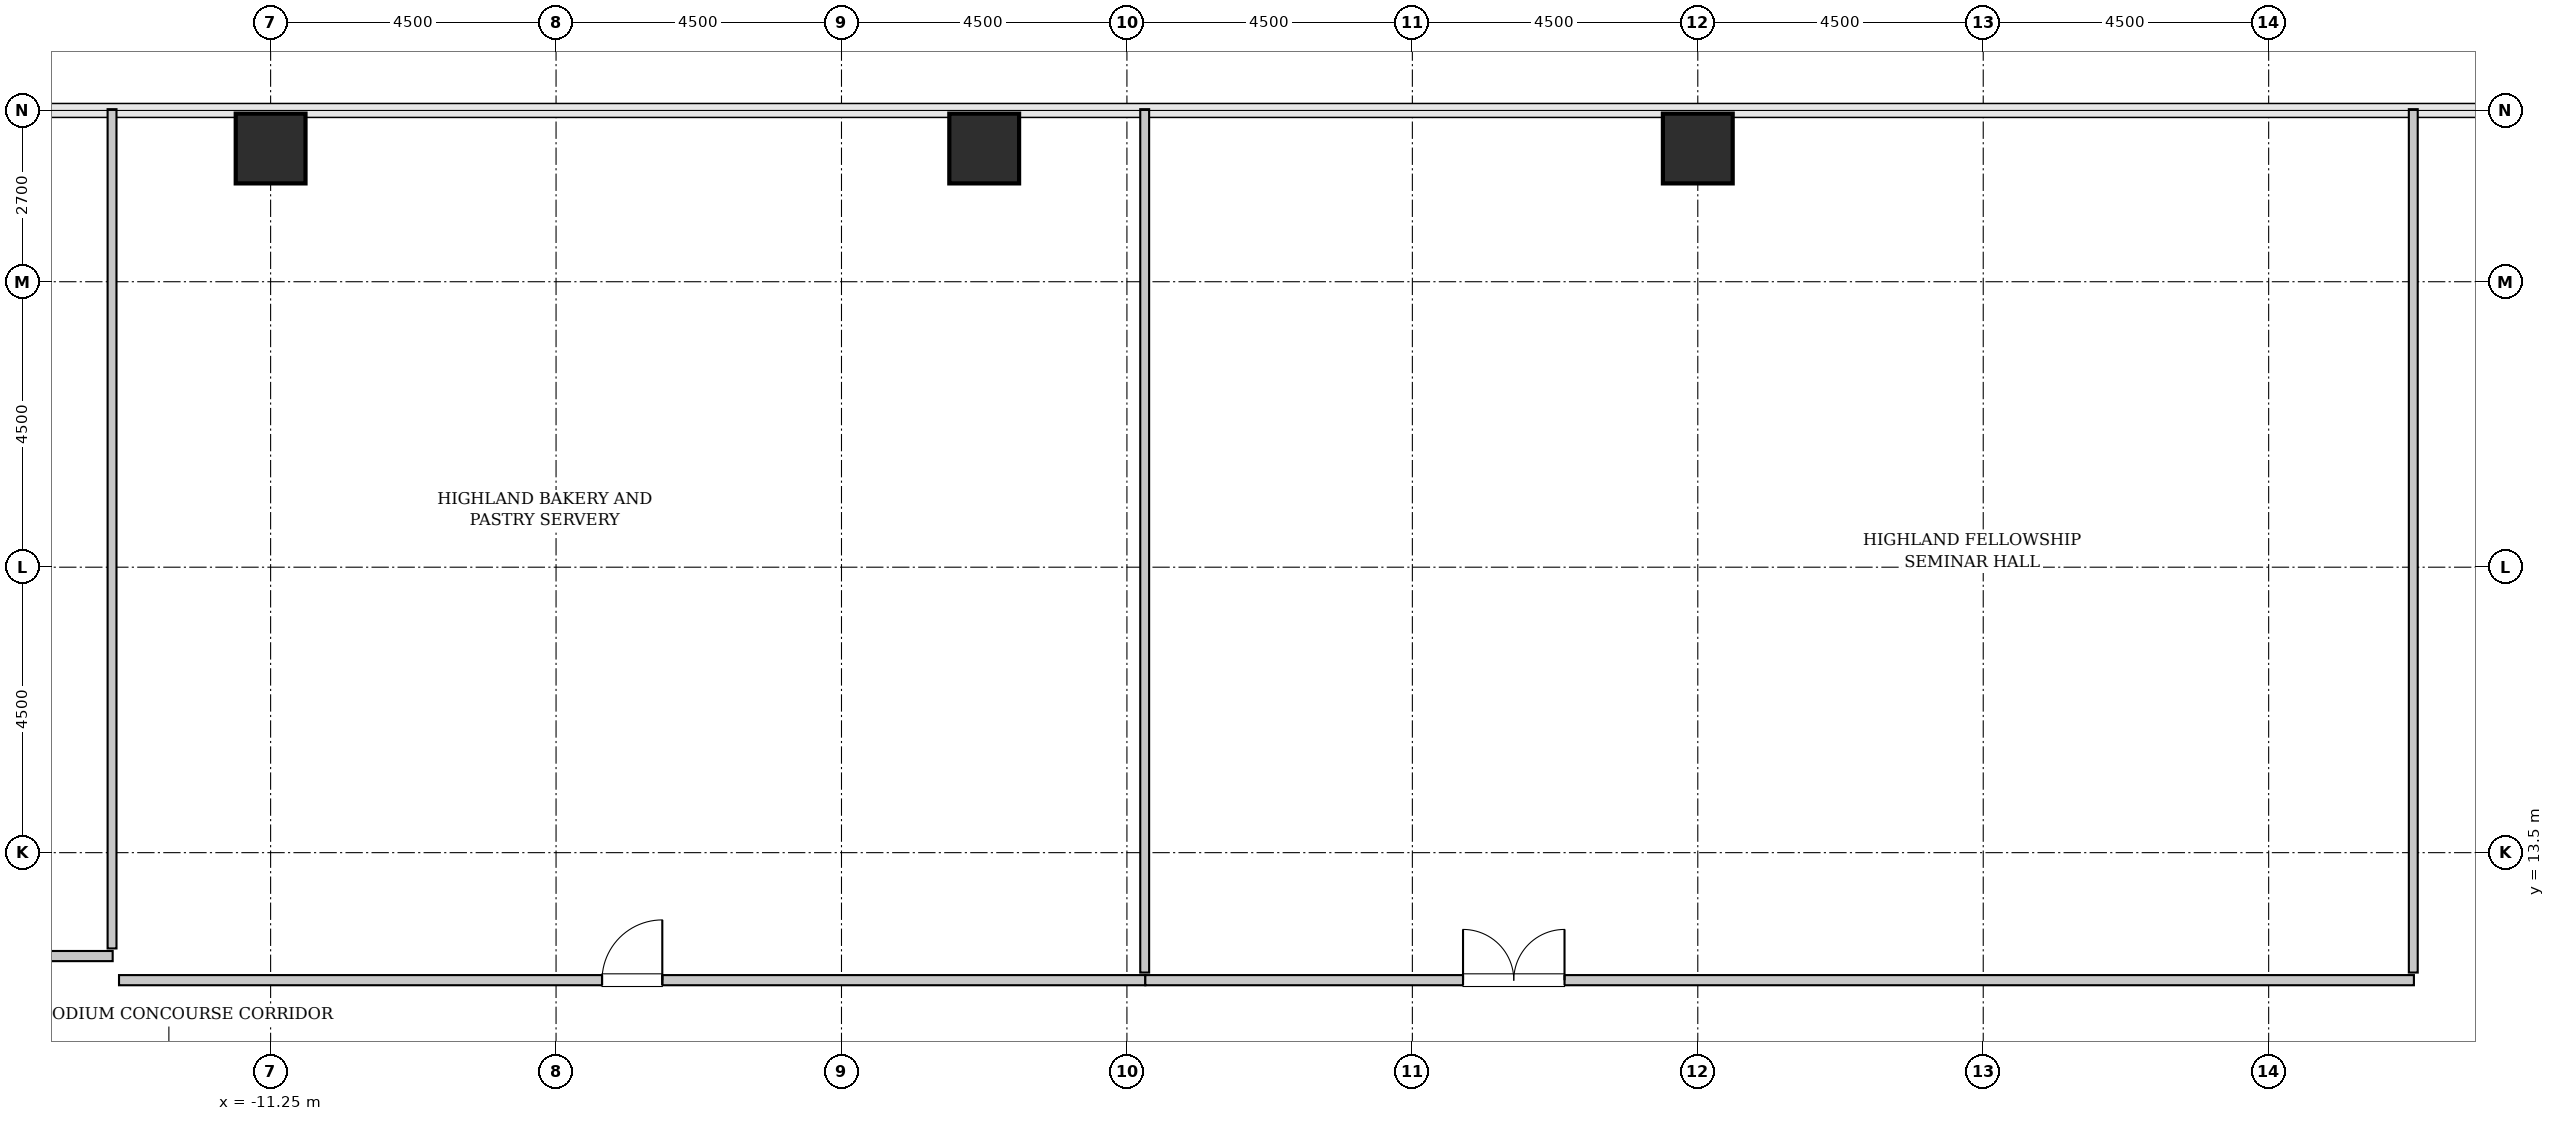
"""IFC4 building model, lengths in metres.
Left out: names, types, materials, properties, quantities, classifications, styles, units other than length and angle.
Written with IfcOpenShell. Run it as: python <this file> out.ifc"""

import sys

from ifc_helpers import new_model, si_unit, direction, frame, frame_2d, origin, origin_2d, place, context, subcontext, project, spatial, rectangle, hollow_rectangle, extrude, source, transform, mapped, element, fill, save


model = new_model("IFC4")
c1 = context("Model", 3, precision=1e-05, world=origin(), true_north=direction((0.0, 1.0)))
c2 = subcontext(c1, "Body", "Model", "MODEL_VIEW")
j1 = project(units=[si_unit("LENGTHUNIT", "METRE"), si_unit("PLANEANGLEUNIT", "RADIAN")], contexts=[c1])
p1 = place(None, origin())
s1 = spatial("IfcSite", under=j1, at=p1, CompositionType="ELEMENT")
p2 = place(p1, origin())
s2 = spatial("IfcBuilding", under=s1, at=p2, CompositionType="ELEMENT")
p3 = place(p2, frame((0.0, 0.0, 22.2)))
s3 = spatial("IfcBuildingStorey", under=s2, at=p3, CompositionType="ELEMENT", Elevation=22.2)
m1 = source(origin(), c2, "Body", "SweptSolid", [
    extrude(hollow_rectangle(XDim=1.1, YDim=1.1, WallThickness=0.055, InnerFilletRadius=0.055, OuterFilletRadius=0.11, at=origin_2d()), origin(), (0.0, 0.0, 1.0), 5.4),
])
for number, where, z_axis, x_axis in (
    (1, (-11.25, 24.6, 0.0), (0.0, 0.0, 1.0), (1.0, 0.0, 0.0)),
    (2, (0.0, 24.6, 0.0), (0.0, 0.0, 1.0), (1.0, 0.0, 0.0)),
    (3, (11.25, 24.6, 0.0), (0.0, 0.0, 1.0), (1.0, 0.0, 0.0)),
):
    element("IfcColumn", number, at=place(p3, frame(where, z_axis=z_axis, x_axis=x_axis)), inside=s3, PredefinedType="COLUMN", context=c2, shape_type="MappedRepresentation", body=[
        mapped(m1, transform((0.0, 0.0, 0.0), x_axis=(1.0, 0.0, 0.0), y_axis=(0.0, 1.0, 0.0), z_axis=(0.0, 0.0, 1.0), scale=1.0)),
    ])
m2 = source(origin(), c2, "Body", "SweptSolid", [
    extrude(rectangle(XDim=13.72, YDim=0.16, at=frame_2d((6.86, 0.0))), origin(), (0.0, 0.0, 1.0), 4.905),
])
p4 = place(p3, frame((-27.46, 11.87, 0.0), z_axis=(0.0, 0.0, 1.0), x_axis=(1.0, 0.0, 0.0)))
e4 = element("IfcWall", 4, at=p4, inside=s3, PredefinedType="PARTITIONING", context=c2, shape_type="MappedRepresentation", body=[
    mapped(m2, transform((0.0, 0.0, 0.0), x_axis=(1.0, 0.0, 0.0), y_axis=(0.0, 1.0, 0.0), z_axis=(0.0, 0.0, 1.0), scale=1.0)),
])
p5 = place(p4, frame((6.385, 0.0, 0.0)))
e5 = element("IfcOpeningElement", 5, at=p5, cuts=e4, PredefinedType="OPENING", context=c2, shape_type="SweptSolid", body=[
    extrude(rectangle(XDim=0.95, YDim=2.1, at=frame_2d((0.475, 1.05))), frame((0.0, 0.09, 0.0), z_axis=(0.0, -1.0, 0.0), x_axis=(1.0, 0.0, 0.0)), (0.0, 0.0, 1.0), 0.18),
])
m3 = source(origin(), c2, "Body", "SweptSolid", [
    extrude(rectangle(XDim=13.23, YDim=0.14, at=frame_2d((6.615, 0.0))), origin(), (0.0, 0.0, 1.0), 4.905),
])
p6 = place(p3, frame((-13.75, 11.99, 0.0), z_axis=(0.0, 0.0, 1.0), x_axis=(0.0, 1.0, 0.0)))
e6 = element("IfcWall", 6, at=p6, inside=s3, PredefinedType="PARTITIONING", context=c2, shape_type="MappedRepresentation", body=[
    mapped(m3, transform((0.0, 0.0, 0.0), x_axis=(1.0, 0.0, 0.0), y_axis=(0.0, 1.0, 0.0), z_axis=(0.0, 0.0, 1.0), scale=1.0)),
])
m4 = source(origin(), c2, "Body", "SweptSolid", [
    extrude(rectangle(XDim=16.18, YDim=0.16, at=frame_2d((8.09, 0.0))), origin(), (0.0, 0.0, 1.0), 4.905),
])
p7 = place(p3, frame((-13.64, 11.49, 0.0), z_axis=(0.0, 0.0, 1.0), x_axis=(1.0, 0.0, 0.0)))
e7 = element("IfcWall", 7, at=p7, inside=s3, PredefinedType="PARTITIONING", context=c2, shape_type="MappedRepresentation", body=[
    mapped(m4, transform((0.0, 0.0, 0.0), x_axis=(1.0, 0.0, 0.0), y_axis=(0.0, 1.0, 0.0), z_axis=(0.0, 0.0, 1.0), scale=1.0)),
])
p8 = place(p7, frame((7.615, 0.0, 0.0)))
e8 = element("IfcOpeningElement", 8, at=p8, cuts=e7, PredefinedType="OPENING", context=c2, shape_type="SweptSolid", body=[
    extrude(rectangle(XDim=0.95, YDim=2.1, at=frame_2d((0.475, 1.05))), frame((0.0, 0.09, 0.0), z_axis=(0.0, -1.0, 0.0), x_axis=(1.0, 0.0, 0.0)), (0.0, 0.0, 1.0), 0.18),
])
m5 = source(origin(), c2, "Body", "SweptSolid", [
    extrude(rectangle(XDim=13.61, YDim=0.14, at=frame_2d((6.805, 0.0))), origin(), (0.0, 0.0, 1.0), 4.905),
])
p9 = place(p3, frame((2.53, 11.61, 0.0), z_axis=(0.0, 0.0, 1.0), x_axis=(0.0, 1.0, 0.0)))
e9 = element("IfcWall", 9, at=p9, inside=s3, PredefinedType="PARTITIONING", context=c2, shape_type="MappedRepresentation", body=[
    mapped(m5, transform((0.0, 0.0, 0.0), x_axis=(1.0, 0.0, 0.0), y_axis=(0.0, 1.0, 0.0), z_axis=(0.0, 0.0, 1.0), scale=1.0)),
])
m6 = source(origin(), c2, "Body", "SweptSolid", [
    extrude(rectangle(XDim=20.0, YDim=0.16, at=frame_2d((10.0, 0.0))), origin(), (0.0, 0.0, 1.0), 4.905),
])
p10 = place(p3, frame((2.54, 11.49, 0.0), z_axis=(0.0, 0.0, 1.0), x_axis=(1.0, 0.0, 0.0)))
e10 = element("IfcWall", 10, at=p10, inside=s3, PredefinedType="PARTITIONING", context=c2, shape_type="MappedRepresentation", body=[
    mapped(m6, transform((0.0, 0.0, 0.0), x_axis=(1.0, 0.0, 0.0), y_axis=(0.0, 1.0, 0.0), z_axis=(0.0, 0.0, 1.0), scale=1.0)),
])
p11 = place(p10, frame((5.009, 0.0, 0.0)))
e11 = element("IfcOpeningElement", 11, at=p11, cuts=e10, PredefinedType="OPENING", context=c2, shape_type="SweptSolid", body=[
    extrude(rectangle(XDim=1.6, YDim=2.3, at=frame_2d((0.8, 1.15))), frame((0.0, 0.09, 0.0), z_axis=(0.0, -1.0, 0.0), x_axis=(1.0, 0.0, 0.0)), (0.0, 0.0, 1.0), 0.18),
])
p12 = place(p3, frame((22.53, 11.61, 0.0), z_axis=(0.0, 0.0, 1.0), x_axis=(0.0, 1.0, 0.0)))
e12 = element("IfcWall", 12, at=p12, inside=s3, PredefinedType="PARTITIONING", context=c2, shape_type="MappedRepresentation", body=[
    mapped(m5, transform((0.0, 0.0, 0.0), x_axis=(1.0, 0.0, 0.0), y_axis=(0.0, 1.0, 0.0), z_axis=(0.0, 0.0, 1.0), scale=1.0)),
])
m7 = source(origin(), c2, "Body", "SweptSolid", [
    extrude(rectangle(XDim=0.95, YDim=2.1, at=frame_2d((0.475, 1.05))), frame((0.0, 0.025, 0.0), z_axis=(0.0, -1.0, 0.0), x_axis=(1.0, 0.0, 0.0)), (0.0, 0.0, 1.0), 0.05),
])
p13 = place(p8, origin())
e13 = element("IfcDoor", 13, at=p13, inside=s3, OperationType="SINGLE_SWING_RIGHT", PredefinedType="DOOR", context=c2, shape_type="MappedRepresentation", body=[
    mapped(m7, transform((0.0, 0.0, 0.0), x_axis=(1.0, 0.0, 0.0), y_axis=(0.0, 1.0, 0.0), z_axis=(0.0, 0.0, 1.0), scale=1.0)),
])
fill(e8, e13)
m8 = source(origin(), c2, "Body", "SweptSolid", [
    extrude(rectangle(XDim=1.6, YDim=2.3, at=frame_2d((0.8, 1.15))), frame((0.0, 0.025, 0.0), z_axis=(0.0, -1.0, 0.0), x_axis=(1.0, 0.0, 0.0)), (0.0, 0.0, 1.0), 0.05),
])
p14 = place(p11, origin())
e14 = element("IfcDoor", 14, at=p14, inside=s3, OperationType="DOUBLE_DOOR_SINGLE_SWING", PredefinedType="DOOR", context=c2, shape_type="MappedRepresentation", body=[
    mapped(m8, transform((0.0, 0.0, 0.0), x_axis=(1.0, 0.0, 0.0), y_axis=(0.0, 1.0, 0.0), z_axis=(0.0, 0.0, 1.0), scale=1.0)),
])
fill(e11, e14)
save(model, sys.argv[1])
